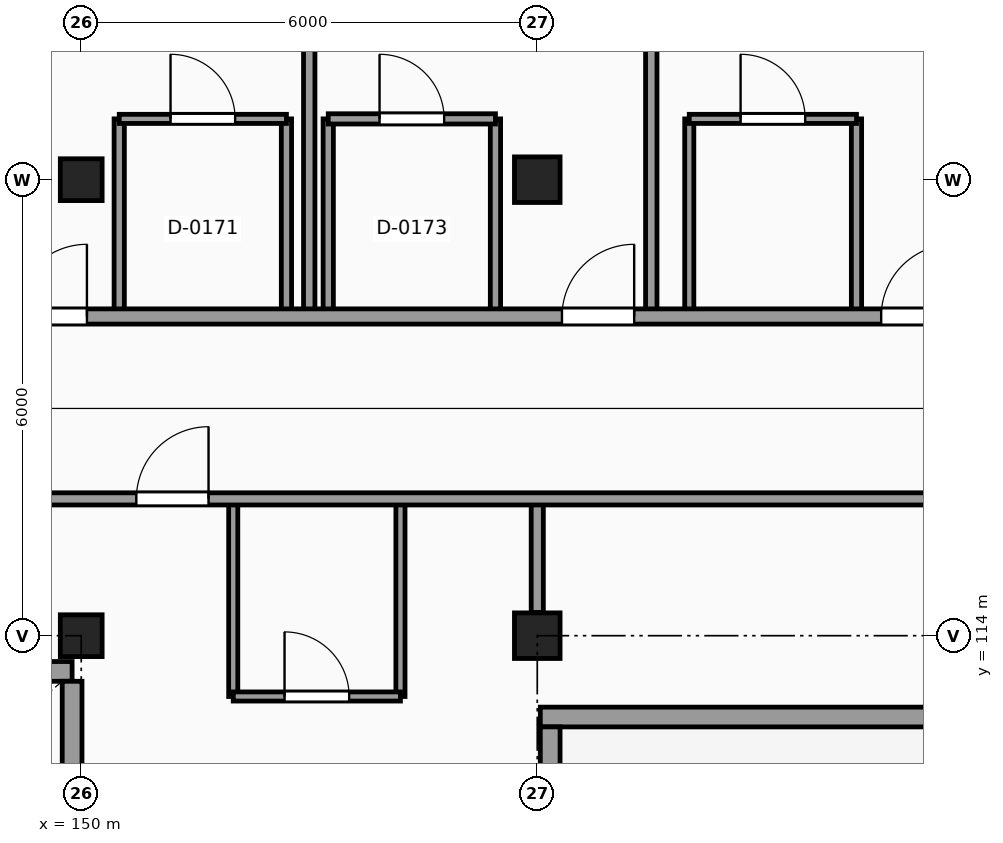
"""IFC4 building model, lengths in metres.
Left out: names, types, materials, properties, quantities, classifications, styles, units other than length and angle.
Written with IfcOpenShell. Run it as: python <this file> out.ifc"""

import sys

from ifc_helpers import new_model, si_unit, direction, frame, frame_2d, origin, origin_2d, place, context, subcontext, project, spatial, rectangle, extrude, element, fill, save


model = new_model("IFC4")
c1 = context("Model", 3, precision=1e-05, world=origin(), true_north=direction((0.0, 1.0)))
c2 = subcontext(c1, "Body", "Model", "MODEL_VIEW")
j1 = project(units=[si_unit("LENGTHUNIT", "METRE"), si_unit("PLANEANGLEUNIT", "RADIAN")], contexts=[c1])
p1 = place(None, origin())
s1 = spatial("IfcSite", under=j1, at=p1, CompositionType="ELEMENT")
p2 = place(p1, origin())
s2 = spatial("IfcBuilding", under=s1, at=p2, CompositionType="ELEMENT")
p3 = place(p2, frame((0.0, 0.0, 24.6)))
s3 = spatial("IfcBuildingStorey", under=s2, at=p3, CompositionType="ELEMENT", Elevation=24.6)
for number, where, z_axis, x_axis in (
    (1, (150.0, 114.0, 0.0), (0.0, 0.0, 1.0), (1.0, 0.0, 0.0)),
    (2, (150.0, 120.0, 0.0), (0.0, 0.0, 1.0), (1.0, 0.0, 0.0)),
):
    element("IfcColumn", number, at=place(p3, frame(where, z_axis=z_axis, x_axis=x_axis)), inside=s3, PredefinedType="COLUMN", context=c2, shape_type="SweptSolid", body=[
        extrude(rectangle(XDim=0.55, YDim=0.55, at=origin_2d()), origin(), (0.0, 0.0, 1.0), 3.6),
    ])
for number, where, z_axis, x_axis in (
    (3, (156.0, 114.0, 0.0), (0.0, 0.0, 1.0), (1.0, 0.0, 0.0)),
    (4, (156.0, 120.0, 0.0), (0.0, 0.0, 1.0), (1.0, 0.0, 0.0)),
):
    element("IfcColumn", number, at=place(p3, frame(where, z_axis=z_axis, x_axis=x_axis)), inside=s3, PredefinedType="COLUMN", context=c2, shape_type="SweptSolid", body=[
        extrude(rectangle(XDim=0.6, YDim=0.6, at=origin_2d()), origin(), (0.0, 0.0, 1.0), 3.6),
    ])
p4 = place(p3, frame((156.04, 112.93, 0.0), z_axis=(0.0, 0.0, 1.0), x_axis=(1.0, 0.0, 0.0)))
e5 = element("IfcWall", 5, at=p4, inside=s3, PredefinedType="SHEAR", context=c2, shape_type="SweptSolid", body=[
    extrude(rectangle(XDim=10.72, YDim=0.26, at=frame_2d((5.36, 0.0))), origin(), (0.0, 0.0, 1.0), 3.6),
])
p5 = place(p3, frame((156.17, 109.2, 0.0), z_axis=(0.0, 0.0, 1.0), x_axis=(0.0, 1.0, 0.0)))
e6 = element("IfcWall", 6, at=p5, inside=s3, PredefinedType="SHEAR", context=c2, shape_type="SweptSolid", body=[
    extrude(rectangle(XDim=3.6, YDim=0.26, at=frame_2d((1.8, 0.0))), origin(), (0.0, 0.0, 1.0), 3.6),
])
p6 = place(p3, frame((146.97, 113.53, 0.0), z_axis=(0.0, 0.0, 1.0), x_axis=(1.0, 0.0, 0.0)))
e7 = element("IfcWall", 7, at=p6, inside=s3, PredefinedType="SHEAR", context=c2, shape_type="SweptSolid", body=[
    extrude(rectangle(XDim=2.91, YDim=0.26, at=frame_2d((1.455, 0.0))), origin(), (0.0, 0.0, 1.0), 3.6),
])
p7 = place(p3, frame((149.88, 111.15, 0.0), z_axis=(0.0, 0.0, 1.0), x_axis=(0.0, 1.0, 0.0)))
e8 = element("IfcWall", 8, at=p7, inside=s3, PredefinedType="SHEAR", context=c2, shape_type="SweptSolid", body=[
    extrude(rectangle(XDim=2.25, YDim=0.26, at=frame_2d((1.125, 0.0))), origin(), (0.0, 0.0, 1.0), 3.6),
])
p8 = place(p3, frame((150.5, 118.2, 0.0), z_axis=(0.0, 0.0, 1.0), x_axis=(0.0, 1.0, 0.0)))
e9 = element("IfcWall", 9, at=p8, inside=s3, PredefinedType="PARTITIONING", context=c2, shape_type="SweptSolid", body=[
    extrude(rectangle(XDim=2.6, YDim=0.135, at=frame_2d((1.3, 0.0))), origin(), (0.0, 0.0, 1.0), 3.38),
])
p9 = place(p3, frame((152.0, 113.2, 0.0), z_axis=(0.0, 0.0, 1.0), x_axis=(0.0, 1.0, 0.0)))
e10 = element("IfcWall", 10, at=p9, inside=s3, PredefinedType="PARTITIONING", context=c2, shape_type="SweptSolid", body=[
    extrude(rectangle(XDim=2.6, YDim=0.12, at=frame_2d((1.3, 0.0))), origin(), (0.0, 0.0, 1.0), 3.38),
])
p10 = place(p3, frame((152.7, 118.2, 0.0), z_axis=(0.0, 0.0, 1.0), x_axis=(0.0, 1.0, 0.0)))
e11 = element("IfcWall", 11, at=p10, inside=s3, PredefinedType="PARTITIONING", context=c2, shape_type="SweptSolid", body=[
    extrude(rectangle(XDim=2.6, YDim=0.135, at=frame_2d((1.3, 0.0))), origin(), (0.0, 0.0, 1.0), 3.38),
])
p11 = place(p3, frame((153.0, 118.2, 0.0), z_axis=(0.0, 0.0, 1.0), x_axis=(0.0, 1.0, 0.0)))
e12 = element("IfcWall", 12, at=p11, inside=s3, PredefinedType="PARTITIONING", context=c2, shape_type="SweptSolid", body=[
    extrude(rectangle(XDim=7.545, YDim=0.15, at=frame_2d((3.772, 0.0))), origin(), (0.0, 0.0, 1.0), 3.38),
])
p12 = place(p3, frame((153.25, 118.2, 0.0), z_axis=(0.0, 0.0, 1.0), x_axis=(0.0, 1.0, 0.0)))
e13 = element("IfcWall", 13, at=p12, inside=s3, PredefinedType="PARTITIONING", context=c2, shape_type="SweptSolid", body=[
    extrude(rectangle(XDim=2.6, YDim=0.135, at=frame_2d((1.3, 0.0))), origin(), (0.0, 0.0, 1.0), 3.38),
])
p13 = place(p3, frame((154.2, 113.2, 0.0), z_axis=(0.0, 0.0, 1.0), x_axis=(0.0, 1.0, 0.0)))
e14 = element("IfcWall", 14, at=p13, inside=s3, PredefinedType="PARTITIONING", context=c2, shape_type="SweptSolid", body=[
    extrude(rectangle(XDim=2.6, YDim=0.12, at=frame_2d((1.3, 0.0))), origin(), (0.0, 0.0, 1.0), 3.38),
])
p14 = place(p3, frame((155.45, 118.2, 0.0), z_axis=(0.0, 0.0, 1.0), x_axis=(0.0, 1.0, 0.0)))
e15 = element("IfcWall", 15, at=p14, inside=s3, PredefinedType="PARTITIONING", context=c2, shape_type="SweptSolid", body=[
    extrude(rectangle(XDim=2.6, YDim=0.135, at=frame_2d((1.3, 0.0))), origin(), (0.0, 0.0, 1.0), 3.38),
])
p15 = place(p3, frame((156.0, 114.305, 0.0), z_axis=(0.0, 0.0, 1.0), x_axis=(0.0, 1.0, 0.0)))
e16 = element("IfcWall", 16, at=p15, inside=s3, PredefinedType="PARTITIONING", context=c2, shape_type="SweptSolid", body=[
    extrude(rectangle(XDim=1.495, YDim=0.16, at=frame_2d((0.748, 0.0))), origin(), (0.0, 0.0, 1.0), 2.58),
])
p16 = place(p3, frame((157.5, 118.2, 0.0), z_axis=(0.0, 0.0, 1.0), x_axis=(0.0, 1.0, 0.0)))
e17 = element("IfcWall", 17, at=p16, inside=s3, PredefinedType="PARTITIONING", context=c2, shape_type="SweptSolid", body=[
    extrude(rectangle(XDim=7.525, YDim=0.15, at=frame_2d((3.763, 0.0))), origin(), (0.0, 0.0, 1.0), 3.38),
])
p17 = place(p3, frame((158.0, 118.2, 0.0), z_axis=(0.0, 0.0, 1.0), x_axis=(0.0, 1.0, 0.0)))
e18 = element("IfcWall", 18, at=p17, inside=s3, PredefinedType="PARTITIONING", context=c2, shape_type="SweptSolid", body=[
    extrude(rectangle(XDim=2.6, YDim=0.12, at=frame_2d((1.3, 0.0))), origin(), (0.0, 0.0, 1.0), 3.38),
])
p18 = place(p3, frame((160.2, 118.2, 0.0), z_axis=(0.0, 0.0, 1.0), x_axis=(0.0, 1.0, 0.0)))
e19 = element("IfcWall", 19, at=p18, inside=s3, PredefinedType="PARTITIONING", context=c2, shape_type="SweptSolid", body=[
    extrude(rectangle(XDim=2.6, YDim=0.135, at=frame_2d((1.3, 0.0))), origin(), (0.0, 0.0, 1.0), 3.38),
])
p19 = place(p3, frame((152.0, 113.2, 0.0), z_axis=(0.0, 0.0, 1.0), x_axis=(1.0, 0.0, 0.0)))
e20 = element("IfcWall", 20, at=p19, inside=s3, PredefinedType="PARTITIONING", context=c2, shape_type="SweptSolid", body=[
    extrude(rectangle(XDim=2.2, YDim=0.12, at=frame_2d((1.1, 0.0))), origin(), (0.0, 0.0, 1.0), 3.38),
])
p20 = place(p19, frame((0.675, 0.0, 0.0)))
e21 = element("IfcOpeningElement", 21, at=p20, cuts=e20, PredefinedType="OPENING", context=c2, shape_type="SweptSolid", body=[
    extrude(rectangle(XDim=0.85, YDim=2.1, at=frame_2d((0.425, 1.05))), frame((0.0, 0.07, 0.0), z_axis=(0.0, -1.0, 0.0), x_axis=(1.0, 0.0, 0.0)), (0.0, 0.0, 1.0), 0.14),
])
p21 = place(p3, frame((66.255, 115.8, 0.0), z_axis=(0.0, 0.0, 1.0), x_axis=(1.0, 0.0, 0.0)))
e22 = element("IfcWall", 22, at=p21, inside=s3, PredefinedType="PARTITIONING", context=c2, shape_type="SweptSolid", body=[
    extrude(rectangle(XDim=103.545, YDim=0.16, at=frame_2d((51.772, 0.0))), origin(), (0.0, 0.0, 1.0), 3.38),
])
p22 = place(p21, frame((80.145, 0.0, 0.0)))
e23 = element("IfcOpeningElement", 23, at=p22, cuts=e22, PredefinedType="OPENING", context=c2, shape_type="SweptSolid", body=[
    extrude(rectangle(XDim=1.2, YDim=2.2, at=frame_2d((0.6, 1.1))), frame((0.0, 0.09, 0.0), z_axis=(0.0, -1.0, 0.0), x_axis=(1.0, 0.0, 0.0)), (0.0, 0.0, 1.0), 0.18),
])
p23 = place(p21, frame((50.145, 0.0, 0.0)))
e24 = element("IfcOpeningElement", 24, at=p23, cuts=e22, PredefinedType="OPENING", context=c2, shape_type="SweptSolid", body=[
    extrude(rectangle(XDim=1.2, YDim=2.2, at=frame_2d((0.6, 1.1))), frame((0.0, 0.09, 0.0), z_axis=(0.0, -1.0, 0.0), x_axis=(1.0, 0.0, 0.0)), (0.0, 0.0, 1.0), 0.18),
])
p24 = place(p21, frame((8.995, 0.0, 0.0)))
e25 = element("IfcOpeningElement", 25, at=p24, cuts=e22, PredefinedType="OPENING", context=c2, shape_type="SweptSolid", body=[
    extrude(rectangle(XDim=1.1, YDim=2.15, at=frame_2d((0.55, 1.075))), frame((0.0, 0.09, 0.0), z_axis=(0.0, -1.0, 0.0), x_axis=(1.0, 0.0, 0.0)), (0.0, 0.0, 1.0), 0.18),
])
p25 = place(p21, frame((55.295, 0.0, 0.0)))
e26 = element("IfcOpeningElement", 26, at=p25, cuts=e22, PredefinedType="OPENING", context=c2, shape_type="SweptSolid", body=[
    extrude(rectangle(XDim=1.0, YDim=2.15, at=frame_2d((0.5, 1.075))), frame((0.0, 0.09, 0.0), z_axis=(0.0, -1.0, 0.0), x_axis=(1.0, 0.0, 0.0)), (0.0, 0.0, 1.0), 0.18),
])
p26 = place(p21, frame((62.265, 0.0, 0.0)))
e27 = element("IfcOpeningElement", 27, at=p26, cuts=e22, PredefinedType="OPENING", context=c2, shape_type="SweptSolid", body=[
    extrude(rectangle(XDim=0.96, YDim=2.15, at=frame_2d((0.48, 1.075))), frame((0.0, 0.09, 0.0), z_axis=(0.0, -1.0, 0.0), x_axis=(1.0, 0.0, 0.0)), (0.0, 0.0, 1.0), 0.18),
])
p27 = place(p21, frame((31.945, 0.0, 0.0)))
e28 = element("IfcOpeningElement", 28, at=p27, cuts=e22, PredefinedType="OPENING", context=c2, shape_type="SweptSolid", body=[
    extrude(rectangle(XDim=1.6, YDim=2.25, at=frame_2d((0.8, 1.125))), frame((0.0, 0.09, 0.0), z_axis=(0.0, -1.0, 0.0), x_axis=(1.0, 0.0, 0.0)), (0.0, 0.0, 1.0), 0.18),
])
p28 = place(p21, frame((18.57, 0.0, 0.0)))
e29 = element("IfcOpeningElement", 29, at=p28, cuts=e22, PredefinedType="OPENING", context=c2, shape_type="SweptSolid", body=[
    extrude(rectangle(XDim=0.95, YDim=2.1, at=frame_2d((0.475, 1.05))), frame((0.0, 0.09, 0.0), z_axis=(0.0, -1.0, 0.0), x_axis=(1.0, 0.0, 0.0)), (0.0, 0.0, 1.0), 0.18),
])
p29 = place(p21, frame((24.57, 0.0, 0.0)))
e30 = element("IfcOpeningElement", 30, at=p29, cuts=e22, PredefinedType="OPENING", context=c2, shape_type="SweptSolid", body=[
    extrude(rectangle(XDim=0.95, YDim=2.1, at=frame_2d((0.475, 1.05))), frame((0.0, 0.09, 0.0), z_axis=(0.0, -1.0, 0.0), x_axis=(1.0, 0.0, 0.0)), (0.0, 0.0, 1.0), 0.18),
])
p30 = place(p21, frame((84.47, 0.0, 0.0)))
e31 = element("IfcOpeningElement", 31, at=p30, cuts=e22, PredefinedType="OPENING", context=c2, shape_type="SweptSolid", body=[
    extrude(rectangle(XDim=0.95, YDim=2.1, at=frame_2d((0.475, 1.05))), frame((0.0, 0.09, 0.0), z_axis=(0.0, -1.0, 0.0), x_axis=(1.0, 0.0, 0.0)), (0.0, 0.0, 1.0), 0.18),
])
p31 = place(p3, frame((66.255, 118.2, 0.0), z_axis=(0.0, 0.0, 1.0), x_axis=(1.0, 0.0, 0.0)))
e32 = element("IfcWall", 32, at=p31, inside=s3, PredefinedType="PARTITIONING", context=c2, shape_type="SweptSolid", body=[
    extrude(rectangle(XDim=110.245, YDim=0.2, at=frame_2d((55.123, 0.0))), origin(), (0.0, 0.0, 1.0), 3.38),
])
p32 = place(p31, frame((7.57, 0.0, 0.0)))
e33 = element("IfcOpeningElement", 33, at=p32, cuts=e32, PredefinedType="OPENING", context=c2, shape_type="SweptSolid", body=[
    extrude(rectangle(XDim=0.95, YDim=2.1, at=frame_2d((0.475, 1.05))), frame((0.0, 0.11, 0.0), z_axis=(0.0, -1.0, 0.0), x_axis=(1.0, 0.0, 0.0)), (0.0, 0.0, 1.0), 0.22),
])
p33 = place(p31, frame((12.07, 0.0, 0.0)))
e34 = element("IfcOpeningElement", 34, at=p33, cuts=e32, PredefinedType="OPENING", context=c2, shape_type="SweptSolid", body=[
    extrude(rectangle(XDim=0.95, YDim=2.1, at=frame_2d((0.475, 1.05))), frame((0.0, 0.11, 0.0), z_axis=(0.0, -1.0, 0.0), x_axis=(1.0, 0.0, 0.0)), (0.0, 0.0, 1.0), 0.22),
])
p34 = place(p31, frame((16.27, 0.0, 0.0)))
e35 = element("IfcOpeningElement", 35, at=p34, cuts=e32, PredefinedType="OPENING", context=c2, shape_type="SweptSolid", body=[
    extrude(rectangle(XDim=0.95, YDim=2.1, at=frame_2d((0.475, 1.05))), frame((0.0, 0.11, 0.0), z_axis=(0.0, -1.0, 0.0), x_axis=(1.0, 0.0, 0.0)), (0.0, 0.0, 1.0), 0.22),
])
p35 = place(p31, frame((18.47, 0.0, 0.0)))
e36 = element("IfcOpeningElement", 36, at=p35, cuts=e32, PredefinedType="OPENING", context=c2, shape_type="SweptSolid", body=[
    extrude(rectangle(XDim=0.95, YDim=2.1, at=frame_2d((0.475, 1.05))), frame((0.0, 0.11, 0.0), z_axis=(0.0, -1.0, 0.0), x_axis=(1.0, 0.0, 0.0)), (0.0, 0.0, 1.0), 0.22),
])
p36 = place(p31, frame((32.32, 0.0, 0.0)))
e37 = element("IfcOpeningElement", 37, at=p36, cuts=e32, PredefinedType="OPENING", context=c2, shape_type="SweptSolid", body=[
    extrude(rectangle(XDim=0.95, YDim=2.1, at=frame_2d((0.475, 1.05))), frame((0.0, 0.11, 0.0), z_axis=(0.0, -1.0, 0.0), x_axis=(1.0, 0.0, 0.0)), (0.0, 0.0, 1.0), 0.22),
])
p37 = place(p31, frame((36.47, 0.0, 0.0)))
e38 = element("IfcOpeningElement", 38, at=p37, cuts=e32, PredefinedType="OPENING", context=c2, shape_type="SweptSolid", body=[
    extrude(rectangle(XDim=0.95, YDim=2.1, at=frame_2d((0.475, 1.05))), frame((0.0, 0.11, 0.0), z_axis=(0.0, -1.0, 0.0), x_axis=(1.0, 0.0, 0.0)), (0.0, 0.0, 1.0), 0.22),
])
p38 = place(p31, frame((46.27, 0.0, 0.0)))
e39 = element("IfcOpeningElement", 39, at=p38, cuts=e32, PredefinedType="OPENING", context=c2, shape_type="SweptSolid", body=[
    extrude(rectangle(XDim=0.95, YDim=2.1, at=frame_2d((0.475, 1.05))), frame((0.0, 0.11, 0.0), z_axis=(0.0, -1.0, 0.0), x_axis=(1.0, 0.0, 0.0)), (0.0, 0.0, 1.0), 0.22),
])
p39 = place(p31, frame((48.47, 0.0, 0.0)))
e40 = element("IfcOpeningElement", 40, at=p39, cuts=e32, PredefinedType="OPENING", context=c2, shape_type="SweptSolid", body=[
    extrude(rectangle(XDim=0.95, YDim=2.1, at=frame_2d((0.475, 1.05))), frame((0.0, 0.11, 0.0), z_axis=(0.0, -1.0, 0.0), x_axis=(1.0, 0.0, 0.0)), (0.0, 0.0, 1.0), 0.22),
])
p40 = place(p31, frame((52.87, 0.0, 0.0)))
e41 = element("IfcOpeningElement", 41, at=p40, cuts=e32, PredefinedType="OPENING", context=c2, shape_type="SweptSolid", body=[
    extrude(rectangle(XDim=0.95, YDim=2.1, at=frame_2d((0.475, 1.05))), frame((0.0, 0.11, 0.0), z_axis=(0.0, -1.0, 0.0), x_axis=(1.0, 0.0, 0.0)), (0.0, 0.0, 1.0), 0.22),
])
p41 = place(p31, frame((60.07, 0.0, 0.0)))
e42 = element("IfcOpeningElement", 42, at=p41, cuts=e32, PredefinedType="OPENING", context=c2, shape_type="SweptSolid", body=[
    extrude(rectangle(XDim=0.95, YDim=2.1, at=frame_2d((0.475, 1.05))), frame((0.0, 0.11, 0.0), z_axis=(0.0, -1.0, 0.0), x_axis=(1.0, 0.0, 0.0)), (0.0, 0.0, 1.0), 0.22),
])
p42 = place(p31, frame((68.32, 0.0, 0.0)))
e43 = element("IfcOpeningElement", 43, at=p42, cuts=e32, PredefinedType="OPENING", context=c2, shape_type="SweptSolid", body=[
    extrude(rectangle(XDim=0.95, YDim=2.1, at=frame_2d((0.475, 1.05))), frame((0.0, 0.11, 0.0), z_axis=(0.0, -1.0, 0.0), x_axis=(1.0, 0.0, 0.0)), (0.0, 0.0, 1.0), 0.22),
])
p43 = place(p31, frame((80.32, 0.0, 0.0)))
e44 = element("IfcOpeningElement", 44, at=p43, cuts=e32, PredefinedType="OPENING", context=c2, shape_type="SweptSolid", body=[
    extrude(rectangle(XDim=0.95, YDim=2.1, at=frame_2d((0.475, 1.05))), frame((0.0, 0.11, 0.0), z_axis=(0.0, -1.0, 0.0), x_axis=(1.0, 0.0, 0.0)), (0.0, 0.0, 1.0), 0.22),
])
p44 = place(p31, frame((82.87, 0.0, 0.0)))
e45 = element("IfcOpeningElement", 45, at=p44, cuts=e32, PredefinedType="OPENING", context=c2, shape_type="SweptSolid", body=[
    extrude(rectangle(XDim=0.95, YDim=2.1, at=frame_2d((0.475, 1.05))), frame((0.0, 0.11, 0.0), z_axis=(0.0, -1.0, 0.0), x_axis=(1.0, 0.0, 0.0)), (0.0, 0.0, 1.0), 0.22),
])
p45 = place(p31, frame((90.07, 0.0, 0.0)))
e46 = element("IfcOpeningElement", 46, at=p45, cuts=e32, PredefinedType="OPENING", context=c2, shape_type="SweptSolid", body=[
    extrude(rectangle(XDim=0.95, YDim=2.1, at=frame_2d((0.475, 1.05))), frame((0.0, 0.11, 0.0), z_axis=(0.0, -1.0, 0.0), x_axis=(1.0, 0.0, 0.0)), (0.0, 0.0, 1.0), 0.22),
])
p46 = place(p31, frame((94.27, 0.0, 0.0)))
e47 = element("IfcOpeningElement", 47, at=p46, cuts=e32, PredefinedType="OPENING", context=c2, shape_type="SweptSolid", body=[
    extrude(rectangle(XDim=0.95, YDim=2.1, at=frame_2d((0.475, 1.05))), frame((0.0, 0.11, 0.0), z_axis=(0.0, -1.0, 0.0), x_axis=(1.0, 0.0, 0.0)), (0.0, 0.0, 1.0), 0.22),
])
p47 = place(p31, frame((103.57, 0.0, 0.0)))
e48 = element("IfcOpeningElement", 48, at=p47, cuts=e32, PredefinedType="OPENING", context=c2, shape_type="SweptSolid", body=[
    extrude(rectangle(XDim=0.95, YDim=2.1, at=frame_2d((0.475, 1.05))), frame((0.0, 0.11, 0.0), z_axis=(0.0, -1.0, 0.0), x_axis=(1.0, 0.0, 0.0)), (0.0, 0.0, 1.0), 0.22),
])
p48 = place(p31, frame((104.97, 0.0, 0.0)))
e49 = element("IfcOpeningElement", 49, at=p48, cuts=e32, PredefinedType="OPENING", context=c2, shape_type="SweptSolid", body=[
    extrude(rectangle(XDim=0.95, YDim=2.1, at=frame_2d((0.475, 1.05))), frame((0.0, 0.11, 0.0), z_axis=(0.0, -1.0, 0.0), x_axis=(1.0, 0.0, 0.0)), (0.0, 0.0, 1.0), 0.22),
])
p49 = place(p3, frame((150.5, 120.8, 0.0), z_axis=(0.0, 0.0, 1.0), x_axis=(1.0, 0.0, 0.0)))
e50 = element("IfcWall", 50, at=p49, inside=s3, PredefinedType="PARTITIONING", context=c2, shape_type="SweptSolid", body=[
    extrude(rectangle(XDim=2.2, YDim=0.12, at=frame_2d((1.1, 0.0))), origin(), (0.0, 0.0, 1.0), 3.38),
])
p50 = place(p49, frame((0.675, 0.0, 0.0)))
e51 = element("IfcOpeningElement", 51, at=p50, cuts=e50, PredefinedType="OPENING", context=c2, shape_type="SweptSolid", body=[
    extrude(rectangle(XDim=0.85, YDim=2.1, at=frame_2d((0.425, 1.05))), frame((0.0, 0.07, 0.0), z_axis=(0.0, -1.0, 0.0), x_axis=(1.0, 0.0, 0.0)), (0.0, 0.0, 1.0), 0.14),
])
p51 = place(p3, frame((153.25, 120.8, 0.0), z_axis=(0.0, 0.0, 1.0), x_axis=(1.0, 0.0, 0.0)))
e52 = element("IfcWall", 52, at=p51, inside=s3, PredefinedType="PARTITIONING", context=c2, shape_type="SweptSolid", body=[
    extrude(rectangle(XDim=2.2, YDim=0.135, at=frame_2d((1.1, 0.0))), origin(), (0.0, 0.0, 1.0), 3.38),
])
p52 = place(p51, frame((0.675, 0.0, 0.0)))
e53 = element("IfcOpeningElement", 53, at=p52, cuts=e52, PredefinedType="OPENING", context=c2, shape_type="SweptSolid", body=[
    extrude(rectangle(XDim=0.85, YDim=2.1, at=frame_2d((0.425, 1.05))), frame((0.0, 0.078, 0.0), z_axis=(0.0, -1.0, 0.0), x_axis=(1.0, 0.0, 0.0)), (0.0, 0.0, 1.0), 0.155),
])
p53 = place(p3, frame((158.0, 120.8, 0.0), z_axis=(0.0, 0.0, 1.0), x_axis=(1.0, 0.0, 0.0)))
e54 = element("IfcWall", 54, at=p53, inside=s3, PredefinedType="PARTITIONING", context=c2, shape_type="SweptSolid", body=[
    extrude(rectangle(XDim=2.2, YDim=0.12, at=frame_2d((1.1, 0.0))), origin(), (0.0, 0.0, 1.0), 3.38),
])
p54 = place(p53, frame((0.675, 0.0, 0.0)))
e55 = element("IfcOpeningElement", 55, at=p54, cuts=e54, PredefinedType="OPENING", context=c2, shape_type="SweptSolid", body=[
    extrude(rectangle(XDim=0.85, YDim=2.1, at=frame_2d((0.425, 1.05))), frame((0.0, 0.07, 0.0), z_axis=(0.0, -1.0, 0.0), x_axis=(1.0, 0.0, 0.0)), (0.0, 0.0, 1.0), 0.14),
])
p55 = place(p50, origin())
e56 = element("IfcDoor", 56, at=p55, inside=s3, OperationType="SINGLE_SWING_LEFT", PredefinedType="DOOR", context=c2, shape_type="SweptSolid", body=[
    extrude(rectangle(XDim=0.85, YDim=2.1, at=frame_2d((0.425, 1.05))), frame((0.0, 0.025, 0.0), z_axis=(0.0, -1.0, 0.0), x_axis=(1.0, 0.0, 0.0)), (0.0, 0.0, 1.0), 0.05),
])
fill(e51, e56)
p56 = place(p44, origin())
e57 = element("IfcDoor", 57, at=p56, inside=s3, OperationType="SINGLE_SWING_RIGHT", PredefinedType="DOOR", context=c2, shape_type="SweptSolid", body=[
    extrude(rectangle(XDim=0.95, YDim=2.1, at=frame_2d((0.475, 1.05))), frame((0.0, 0.025, 0.0), z_axis=(0.0, -1.0, 0.0), x_axis=(1.0, 0.0, 0.0)), (0.0, 0.0, 1.0), 0.05),
])
fill(e45, e57)
p57 = place(p52, origin())
e58 = element("IfcDoor", 58, at=p57, inside=s3, OperationType="SINGLE_SWING_LEFT", PredefinedType="DOOR", context=c2, shape_type="SweptSolid", body=[
    extrude(rectangle(XDim=0.85, YDim=2.1, at=frame_2d((0.425, 1.05))), frame((0.0, 0.025, 0.0), z_axis=(0.0, -1.0, 0.0), x_axis=(1.0, 0.0, 0.0)), (0.0, 0.0, 1.0), 0.05),
])
fill(e53, e58)
p58 = place(p45, origin())
e59 = element("IfcDoor", 59, at=p58, inside=s3, OperationType="SINGLE_SWING_RIGHT", PredefinedType="DOOR", context=c2, shape_type="SweptSolid", body=[
    extrude(rectangle(XDim=0.95, YDim=2.1, at=frame_2d((0.475, 1.05))), frame((0.0, 0.025, 0.0), z_axis=(0.0, -1.0, 0.0), x_axis=(1.0, 0.0, 0.0)), (0.0, 0.0, 1.0), 0.05),
])
fill(e46, e59)
p59 = place(p54, origin())
e60 = element("IfcDoor", 60, at=p59, inside=s3, OperationType="SINGLE_SWING_LEFT", PredefinedType="DOOR", context=c2, shape_type="SweptSolid", body=[
    extrude(rectangle(XDim=0.85, YDim=2.1, at=frame_2d((0.425, 1.05))), frame((0.0, 0.025, 0.0), z_axis=(0.0, -1.0, 0.0), x_axis=(1.0, 0.0, 0.0)), (0.0, 0.0, 1.0), 0.05),
])
fill(e55, e60)
p60 = place(p46, origin())
e61 = element("IfcDoor", 61, at=p60, inside=s3, OperationType="SINGLE_SWING_RIGHT", PredefinedType="DOOR", context=c2, shape_type="SweptSolid", body=[
    extrude(rectangle(XDim=0.95, YDim=2.1, at=frame_2d((0.475, 1.05))), frame((0.0, 0.025, 0.0), z_axis=(0.0, -1.0, 0.0), x_axis=(1.0, 0.0, 0.0)), (0.0, 0.0, 1.0), 0.05),
])
fill(e47, e61)
p61 = place(p20, origin())
e62 = element("IfcDoor", 62, at=p61, inside=s3, OperationType="SINGLE_SWING_LEFT", PredefinedType="DOOR", context=c2, shape_type="SweptSolid", body=[
    extrude(rectangle(XDim=0.85, YDim=2.1, at=frame_2d((0.425, 1.05))), frame((0.0, 0.025, 0.0), z_axis=(0.0, -1.0, 0.0), x_axis=(1.0, 0.0, 0.0)), (0.0, 0.0, 1.0), 0.05),
])
fill(e21, e62)
p62 = place(p30, origin())
e63 = element("IfcDoor", 63, at=p62, inside=s3, OperationType="SINGLE_SWING_RIGHT", PredefinedType="DOOR", context=c2, shape_type="SweptSolid", body=[
    extrude(rectangle(XDim=0.95, YDim=2.1, at=frame_2d((0.475, 1.05))), frame((0.0, 0.025, 0.0), z_axis=(0.0, -1.0, 0.0), x_axis=(1.0, 0.0, 0.0)), (0.0, 0.0, 1.0), 0.05),
])
fill(e31, e63)
save(model, sys.argv[1])
